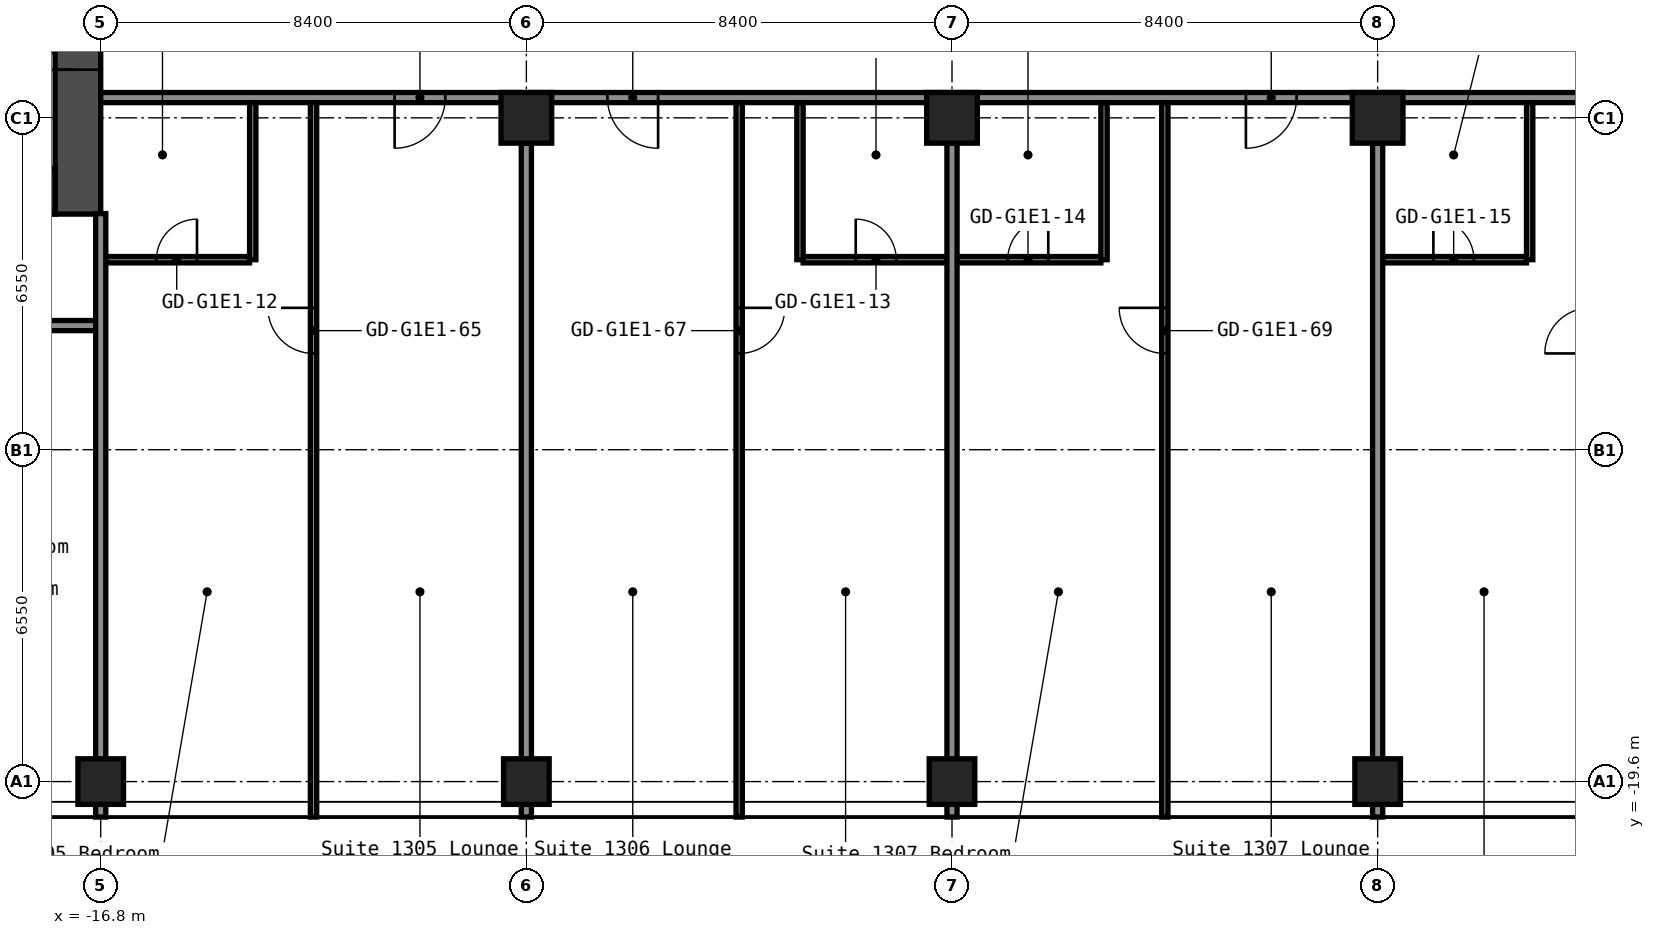
"""IFC4 building model, lengths in metres.
Left out: names, types, materials, properties, quantities, classifications, styles, units other than length and angle.
Written with IfcOpenShell. Run it as: python <this file> out.ifc"""

import sys

from ifc_helpers import new_model, si_unit, direction, frame, frame_2d, origin, origin_2d, place, context, subcontext, project, spatial, rectangle, hollow_rectangle, extrude, element, fill, save


model = new_model("IFC4")
c1 = context("Model", 3, precision=1e-05, world=origin(), true_north=direction((0.0, 1.0)))
c2 = subcontext(c1, "Body", "Model", "MODEL_VIEW")
j1 = project(units=[si_unit("LENGTHUNIT", "METRE"), si_unit("PLANEANGLEUNIT", "RADIAN")], contexts=[c1])
p1 = place(None, origin())
s1 = spatial("IfcSite", under=j1, at=p1, CompositionType="ELEMENT")
p2 = place(p1, origin())
s2 = spatial("IfcBuilding", under=s1, at=p2, CompositionType="ELEMENT")
p3 = place(p2, frame((0.0, 0.0, 48.6)))
s3 = spatial("IfcBuildingStorey", under=s2, at=p3, CompositionType="ELEMENT", Elevation=48.6)
for number, where, z_axis, x_axis in (
    (1, (-16.8, -19.6, 0.0), (0.0, 0.0, 1.0), (1.0, 0.0, 0.0)),
    (2, (-8.4, -19.6, 0.0), (0.0, 0.0, 1.0), (1.0, 0.0, 0.0)),
):
    element("IfcColumn", number, at=place(p3, frame(where, z_axis=z_axis, x_axis=x_axis)), inside=s3, PredefinedType="COLUMN", context=c2, shape_type="SweptSolid", body=[
        extrude(hollow_rectangle(XDim=0.9, YDim=0.9, WallThickness=0.036, at=origin_2d()), origin(), (0.0, 0.0, 1.0), 2.8),
    ])
p4 = place(p3, frame((-8.4, -6.5, 0.0), z_axis=(0.0, 0.0, 1.0), x_axis=(1.0, 0.0, 0.0)))
e3 = element("IfcColumn", 3, at=p4, inside=s3, PredefinedType="COLUMN", context=c2, shape_type="SweptSolid", body=[
    extrude(hollow_rectangle(XDim=1.0, YDim=1.0, WallThickness=0.04, at=origin_2d()), origin(), (0.0, 0.0, 1.0), 2.8),
])
p5 = place(p3, frame((0.0, -19.6, 0.0), z_axis=(0.0, 0.0, 1.0), x_axis=(1.0, 0.0, 0.0)))
e4 = element("IfcColumn", 4, at=p5, inside=s3, PredefinedType="COLUMN", context=c2, shape_type="SweptSolid", body=[
    extrude(hollow_rectangle(XDim=0.9, YDim=0.9, WallThickness=0.036, at=origin_2d()), origin(), (0.0, 0.0, 1.0), 2.8),
])
p6 = place(p3, frame((0.0, -6.5, 0.0), z_axis=(0.0, 0.0, 1.0), x_axis=(1.0, 0.0, 0.0)))
e5 = element("IfcColumn", 5, at=p6, inside=s3, PredefinedType="COLUMN", context=c2, shape_type="SweptSolid", body=[
    extrude(hollow_rectangle(XDim=1.0, YDim=1.0, WallThickness=0.04, at=origin_2d()), origin(), (0.0, 0.0, 1.0), 2.8),
])
p7 = place(p3, frame((8.4, -19.6, 0.0), z_axis=(0.0, 0.0, 1.0), x_axis=(1.0, 0.0, 0.0)))
e6 = element("IfcColumn", 6, at=p7, inside=s3, PredefinedType="COLUMN", context=c2, shape_type="SweptSolid", body=[
    extrude(hollow_rectangle(XDim=0.9, YDim=0.9, WallThickness=0.036, at=origin_2d()), origin(), (0.0, 0.0, 1.0), 2.8),
])
p8 = place(p3, frame((8.4, -6.5, 0.0), z_axis=(0.0, 0.0, 1.0), x_axis=(1.0, 0.0, 0.0)))
e7 = element("IfcColumn", 7, at=p8, inside=s3, PredefinedType="COLUMN", context=c2, shape_type="SweptSolid", body=[
    extrude(hollow_rectangle(XDim=1.0, YDim=1.0, WallThickness=0.04, at=origin_2d()), origin(), (0.0, 0.0, 1.0), 2.8),
])
p9 = place(p3, frame((-17.25, -8.4, 0.0), z_axis=(0.0, 0.0, 1.0), x_axis=(0.0, 1.0, 0.0)))
e8 = element("IfcWall", 8, at=p9, inside=s3, PredefinedType="SHEAR", context=c2, shape_type="SweptSolid", body=[
    extrude(rectangle(XDim=16.8, YDim=0.9, at=frame_2d((8.4, 0.0))), origin(), (0.0, 0.0, 1.0), 2.8),
])
p10 = place(p9, frame((12.75, 0.0, 0.0)))
e9 = element("IfcOpeningElement", 9, at=p10, cuts=e8, PredefinedType="OPENING", context=c2, shape_type="SweptSolid", body=[
    extrude(rectangle(XDim=1.2, YDim=2.1, at=frame_2d((0.6, 1.05))), frame((0.0, 0.46, 0.0), z_axis=(0.0, -1.0, 0.0), x_axis=(1.0, 0.0, 0.0)), (0.0, 0.0, 1.0), 0.92),
])
p11 = place(p9, frame((2.85, 0.0, 0.0)))
e10 = element("IfcOpeningElement", 10, at=p11, cuts=e8, PredefinedType="OPENING", context=c2, shape_type="SweptSolid", body=[
    extrude(rectangle(XDim=1.2, YDim=2.1, at=frame_2d((0.6, 1.05))), frame((0.0, 0.46, 0.0), z_axis=(0.0, -1.0, 0.0), x_axis=(1.0, 0.0, 0.0)), (0.0, 0.0, 1.0), 0.92),
])
p12 = place(p3, frame((-32.7, -7.95, 0.0), z_axis=(0.0, 0.0, 1.0), x_axis=(1.0, 0.0, 0.0)))
e11 = element("IfcWall", 11, at=p12, inside=s3, PredefinedType="SHEAR", context=c2, shape_type="SweptSolid", body=[
    extrude(rectangle(XDim=15.0, YDim=0.9, at=frame_2d((7.5, 0.0))), origin(), (0.0, 0.0, 1.0), 2.8),
])
p13 = place(p12, frame((11.45, 0.0, 0.0)))
e12 = element("IfcOpeningElement", 12, at=p13, cuts=e11, PredefinedType="OPENING", context=c2, shape_type="SweptSolid", body=[
    extrude(rectangle(XDim=1.0, YDim=2.1, at=frame_2d((0.5, 1.05))), frame((0.0, 0.46, 0.0), z_axis=(0.0, -1.0, 0.0), x_axis=(1.0, 0.0, 0.0)), (0.0, 0.0, 1.0), 0.92),
])
p14 = place(p3, frame((-51.1, -10.6, 0.0), z_axis=(0.0, 0.0, 1.0), x_axis=(1.0, 0.0, 0.0)))
e13 = element("IfcWall", 13, at=p14, inside=s3, PredefinedType="PARTITIONING", context=c2, shape_type="SweptSolid", body=[
    extrude(rectangle(XDim=34.3, YDim=0.2, at=frame_2d((17.15, 0.0))), origin(), (0.0, 0.0, 1.0), 2.8),
])
p15 = place(p14, frame((2.58, 0.0, 0.0)))
e14 = element("IfcOpeningElement", 14, at=p15, cuts=e13, PredefinedType="OPENING", context=c2, shape_type="SweptSolid", body=[
    extrude(rectangle(XDim=0.9, YDim=2.1, at=frame_2d((0.45, 1.05))), frame((0.0, 0.11, 0.0), z_axis=(0.0, -1.0, 0.0), x_axis=(1.0, 0.0, 0.0)), (0.0, 0.0, 1.0), 0.22),
])
p16 = place(p14, frame((6.98, 0.0, 0.0)))
e15 = element("IfcOpeningElement", 15, at=p16, cuts=e13, PredefinedType="OPENING", context=c2, shape_type="SweptSolid", body=[
    extrude(rectangle(XDim=0.9, YDim=2.1, at=frame_2d((0.45, 1.05))), frame((0.0, 0.11, 0.0), z_axis=(0.0, -1.0, 0.0), x_axis=(1.0, 0.0, 0.0)), (0.0, 0.0, 1.0), 0.22),
])
p17 = place(p14, frame((12.8, 0.0, 0.0)))
e16 = element("IfcOpeningElement", 16, at=p17, cuts=e13, PredefinedType="OPENING", context=c2, shape_type="SweptSolid", body=[
    extrude(rectangle(XDim=1.0, YDim=2.1, at=frame_2d((0.5, 1.05))), frame((0.0, 0.11, 0.0), z_axis=(0.0, -1.0, 0.0), x_axis=(1.0, 0.0, 0.0)), (0.0, 0.0, 1.0), 0.22),
])
p18 = place(p14, frame((19.4, 0.0, 0.0)))
e17 = element("IfcOpeningElement", 17, at=p18, cuts=e13, PredefinedType="OPENING", context=c2, shape_type="SweptSolid", body=[
    extrude(rectangle(XDim=0.9, YDim=2.1, at=frame_2d((0.45, 1.05))), frame((0.0, 0.11, 0.0), z_axis=(0.0, -1.0, 0.0), x_axis=(1.0, 0.0, 0.0)), (0.0, 0.0, 1.0), 0.22),
])
p19 = place(p14, frame((23.6, 0.0, 0.0)))
e18 = element("IfcOpeningElement", 18, at=p19, cuts=e13, PredefinedType="OPENING", context=c2, shape_type="SweptSolid", body=[
    extrude(rectangle(XDim=0.9, YDim=2.1, at=frame_2d((0.45, 1.05))), frame((0.0, 0.11, 0.0), z_axis=(0.0, -1.0, 0.0), x_axis=(1.0, 0.0, 0.0)), (0.0, 0.0, 1.0), 0.22),
])
p20 = place(p14, frame((27.3, 0.0, 0.0)))
e19 = element("IfcOpeningElement", 19, at=p20, cuts=e13, PredefinedType="OPENING", context=c2, shape_type="SweptSolid", body=[
    extrude(rectangle(XDim=0.9, YDim=2.1, at=frame_2d((0.45, 1.05))), frame((0.0, 0.11, 0.0), z_axis=(0.0, -1.0, 0.0), x_axis=(1.0, 0.0, 0.0)), (0.0, 0.0, 1.0), 0.22),
])
p21 = place(p14, frame((31.5, 0.0, 0.0)))
e20 = element("IfcOpeningElement", 20, at=p21, cuts=e13, PredefinedType="OPENING", context=c2, shape_type="SweptSolid", body=[
    extrude(rectangle(XDim=0.9, YDim=2.1, at=frame_2d((0.45, 1.05))), frame((0.0, 0.11, 0.0), z_axis=(0.0, -1.0, 0.0), x_axis=(1.0, 0.0, 0.0)), (0.0, 0.0, 1.0), 0.22),
])
p22 = place(p3, frame((-16.7, -9.3, 0.0), z_axis=(0.0, 0.0, 1.0), x_axis=(1.0, 0.0, 0.0)))
e21 = element("IfcWall", 21, at=p22, inside=s3, PredefinedType="PARTITIONING", context=c2, shape_type="SweptSolid", body=[
    extrude(rectangle(XDim=2.837, YDim=0.125, at=frame_2d((1.419, 0.0))), origin(), (0.0, 0.0, 1.0), 2.8),
])
p23 = place(p22, frame((1.0, 0.0, 0.0)))
e22 = element("IfcOpeningElement", 22, at=p23, cuts=e21, PredefinedType="OPENING", context=c2, shape_type="SweptSolid", body=[
    extrude(rectangle(XDim=0.8, YDim=2.1, at=frame_2d((0.4, 1.05))), frame((0.0, 0.073, 0.0), z_axis=(0.0, -1.0, 0.0), x_axis=(1.0, 0.0, 0.0)), (0.0, 0.0, 1.0), 0.145),
])
p24 = place(p3, frame((-2.938, -9.3, 0.0), z_axis=(0.0, 0.0, 1.0), x_axis=(1.0, 0.0, 0.0)))
e23 = element("IfcWall", 23, at=p24, inside=s3, PredefinedType="PARTITIONING", context=c2, shape_type="SweptSolid", body=[
    extrude(rectangle(XDim=5.875, YDim=0.125, at=frame_2d((2.938, 0.0))), origin(), (0.0, 0.0, 1.0), 2.8),
])
p25 = place(p24, frame((1.038, 0.0, 0.0)))
e24 = element("IfcOpeningElement", 24, at=p25, cuts=e23, PredefinedType="OPENING", context=c2, shape_type="SweptSolid", body=[
    extrude(rectangle(XDim=0.8, YDim=2.1, at=frame_2d((0.4, 1.05))), frame((0.0, 0.073, 0.0), z_axis=(0.0, -1.0, 0.0), x_axis=(1.0, 0.0, 0.0)), (0.0, 0.0, 1.0), 0.145),
])
p26 = place(p24, frame((4.038, 0.0, 0.0)))
e25 = element("IfcOpeningElement", 25, at=p26, cuts=e23, PredefinedType="OPENING", context=c2, shape_type="SweptSolid", body=[
    extrude(rectangle(XDim=0.8, YDim=2.1, at=frame_2d((0.4, 1.05))), frame((0.0, 0.073, 0.0), z_axis=(0.0, -1.0, 0.0), x_axis=(1.0, 0.0, 0.0)), (0.0, 0.0, 1.0), 0.145),
])
p27 = place(p3, frame((8.5, -9.3, 0.0), z_axis=(0.0, 0.0, 1.0), x_axis=(1.0, 0.0, 0.0)))
e26 = element("IfcWall", 26, at=p27, inside=s3, PredefinedType="PARTITIONING", context=c2, shape_type="SweptSolid", body=[
    extrude(rectangle(XDim=2.837, YDim=0.125, at=frame_2d((1.419, 0.0))), origin(), (0.0, 0.0, 1.0), 2.8),
])
p28 = place(p27, frame((1.0, 0.0, 0.0)))
e27 = element("IfcOpeningElement", 27, at=p28, cuts=e26, PredefinedType="OPENING", context=c2, shape_type="SweptSolid", body=[
    extrude(rectangle(XDim=0.8, YDim=2.1, at=frame_2d((0.4, 1.05))), frame((0.0, 0.073, 0.0), z_axis=(0.0, -1.0, 0.0), x_axis=(1.0, 0.0, 0.0)), (0.0, 0.0, 1.0), 0.145),
])
p29 = place(p3, frame((-16.8, -6.1, 0.0), z_axis=(0.0, 0.0, 1.0), x_axis=(1.0, 0.0, 0.0)))
e28 = element("IfcWall", 28, at=p29, inside=s3, PredefinedType="PARTITIONING", context=c2, shape_type="SweptSolid", body=[
    extrude(rectangle(XDim=33.6, YDim=0.2, at=frame_2d((16.8, 0.0))), origin(), (0.0, 0.0, 1.0), 2.8),
])
p30 = place(p29, frame((5.8, 0.0, 0.0)))
e29 = element("IfcOpeningElement", 29, at=p30, cuts=e28, PredefinedType="OPENING", context=c2, shape_type="SweptSolid", body=[
    extrude(rectangle(XDim=1.0, YDim=2.1, at=frame_2d((0.5, 1.05))), frame((0.0, 0.11, 0.0), z_axis=(0.0, -1.0, 0.0), x_axis=(1.0, 0.0, 0.0)), (0.0, 0.0, 1.0), 0.22),
])
p31 = place(p29, frame((10.0, 0.0, 0.0)))
e30 = element("IfcOpeningElement", 30, at=p31, cuts=e28, PredefinedType="OPENING", context=c2, shape_type="SweptSolid", body=[
    extrude(rectangle(XDim=1.0, YDim=2.1, at=frame_2d((0.5, 1.05))), frame((0.0, 0.11, 0.0), z_axis=(0.0, -1.0, 0.0), x_axis=(1.0, 0.0, 0.0)), (0.0, 0.0, 1.0), 0.22),
])
p32 = place(p29, frame((22.6, 0.0, 0.0)))
e31 = element("IfcOpeningElement", 31, at=p32, cuts=e28, PredefinedType="OPENING", context=c2, shape_type="SweptSolid", body=[
    extrude(rectangle(XDim=1.0, YDim=2.1, at=frame_2d((0.5, 1.05))), frame((0.0, 0.11, 0.0), z_axis=(0.0, -1.0, 0.0), x_axis=(1.0, 0.0, 0.0)), (0.0, 0.0, 1.0), 0.22),
])
p33 = place(p29, frame((31.0, 0.0, 0.0)))
e32 = element("IfcOpeningElement", 32, at=p33, cuts=e28, PredefinedType="OPENING", context=c2, shape_type="SweptSolid", body=[
    extrude(rectangle(XDim=1.0, YDim=2.1, at=frame_2d((0.5, 1.05))), frame((0.0, 0.11, 0.0), z_axis=(0.0, -1.0, 0.0), x_axis=(1.0, 0.0, 0.0)), (0.0, 0.0, 1.0), 0.22),
])
p34 = place(p3, frame((-16.8, -20.3, 0.0), z_axis=(0.0, 0.0, 1.0), x_axis=(0.0, 1.0, 0.0)))
e33 = element("IfcWall", 33, at=p34, inside=s3, PredefinedType="PARTITIONING", context=c2, shape_type="SweptSolid", body=[
    extrude(rectangle(XDim=11.91, YDim=0.2, at=frame_2d((5.955, 0.0))), origin(), (0.0, 0.0, 1.0), 2.8),
])
p35 = place(p3, frame((-13.8, -9.3, 0.0), z_axis=(0.0, 0.0, 1.0), x_axis=(0.0, 1.0, 0.0)))
e34 = element("IfcWall", 34, at=p35, inside=s3, PredefinedType="PARTITIONING", context=c2, shape_type="SweptSolid", body=[
    extrude(rectangle(XDim=3.1, YDim=0.125, at=frame_2d((1.55, 0.0))), origin(), (0.0, 0.0, 1.0), 2.8),
])
p36 = place(p3, frame((-12.6, -20.3, 0.0), z_axis=(0.0, 0.0, 1.0), x_axis=(0.0, 1.0, 0.0)))
e35 = element("IfcWall", 35, at=p36, inside=s3, PredefinedType="PARTITIONING", context=c2, shape_type="SweptSolid", body=[
    extrude(rectangle(XDim=14.1, YDim=0.125, at=frame_2d((7.05, 0.0))), origin(), (0.0, 0.0, 1.0), 2.8),
])
p37 = place(p36, frame((9.15, 0.0, 0.0)))
e36 = element("IfcOpeningElement", 36, at=p37, cuts=e35, PredefinedType="OPENING", context=c2, shape_type="SweptSolid", body=[
    extrude(rectangle(XDim=0.9, YDim=2.1, at=frame_2d((0.45, 1.05))), frame((0.0, 0.073, 0.0), z_axis=(0.0, -1.0, 0.0), x_axis=(1.0, 0.0, 0.0)), (0.0, 0.0, 1.0), 0.145),
])
p38 = place(p3, frame((-8.4, -20.3, 0.0), z_axis=(0.0, 0.0, 1.0), x_axis=(0.0, 1.0, 0.0)))
e37 = element("IfcWall", 37, at=p38, inside=s3, PredefinedType="PARTITIONING", context=c2, shape_type="SweptSolid", body=[
    extrude(rectangle(XDim=13.31, YDim=0.2, at=frame_2d((6.655, 0.0))), origin(), (0.0, 0.0, 1.0), 2.8),
])
p39 = place(p3, frame((-4.2, -20.3, 0.0), z_axis=(0.0, 0.0, 1.0), x_axis=(0.0, 1.0, 0.0)))
e38 = element("IfcWall", 38, at=p39, inside=s3, PredefinedType="PARTITIONING", context=c2, shape_type="SweptSolid", body=[
    extrude(rectangle(XDim=14.1, YDim=0.125, at=frame_2d((7.05, 0.0))), origin(), (0.0, 0.0, 1.0), 2.8),
])
p40 = place(p39, frame((9.15, 0.0, 0.0)))
e39 = element("IfcOpeningElement", 39, at=p40, cuts=e38, PredefinedType="OPENING", context=c2, shape_type="SweptSolid", body=[
    extrude(rectangle(XDim=0.9, YDim=2.1, at=frame_2d((0.45, 1.05))), frame((0.0, 0.073, 0.0), z_axis=(0.0, -1.0, 0.0), x_axis=(1.0, 0.0, 0.0)), (0.0, 0.0, 1.0), 0.145),
])
p41 = place(p3, frame((-3.0, -9.3, 0.0), z_axis=(0.0, 0.0, 1.0), x_axis=(0.0, 1.0, 0.0)))
e40 = element("IfcWall", 40, at=p41, inside=s3, PredefinedType="PARTITIONING", context=c2, shape_type="SweptSolid", body=[
    extrude(rectangle(XDim=3.1, YDim=0.125, at=frame_2d((1.55, 0.0))), origin(), (0.0, 0.0, 1.0), 2.8),
])
p42 = place(p3, frame((0.0, -20.3, 0.0), z_axis=(0.0, 0.0, 1.0), x_axis=(0.0, 1.0, 0.0)))
e41 = element("IfcWall", 41, at=p42, inside=s3, PredefinedType="PARTITIONING", context=c2, shape_type="SweptSolid", body=[
    extrude(rectangle(XDim=13.31, YDim=0.2, at=frame_2d((6.655, 0.0))), origin(), (0.0, 0.0, 1.0), 2.8),
])
p43 = place(p3, frame((3.0, -9.3, 0.0), z_axis=(0.0, 0.0, 1.0), x_axis=(0.0, 1.0, 0.0)))
e42 = element("IfcWall", 42, at=p43, inside=s3, PredefinedType="PARTITIONING", context=c2, shape_type="SweptSolid", body=[
    extrude(rectangle(XDim=3.1, YDim=0.125, at=frame_2d((1.55, 0.0))), origin(), (0.0, 0.0, 1.0), 2.8),
])
p44 = place(p3, frame((4.2, -20.3, 0.0), z_axis=(0.0, 0.0, 1.0), x_axis=(0.0, 1.0, 0.0)))
e43 = element("IfcWall", 43, at=p44, inside=s3, PredefinedType="PARTITIONING", context=c2, shape_type="SweptSolid", body=[
    extrude(rectangle(XDim=14.1, YDim=0.125, at=frame_2d((7.05, 0.0))), origin(), (0.0, 0.0, 1.0), 2.8),
])
p45 = place(p44, frame((9.15, 0.0, 0.0)))
e44 = element("IfcOpeningElement", 44, at=p45, cuts=e43, PredefinedType="OPENING", context=c2, shape_type="SweptSolid", body=[
    extrude(rectangle(XDim=0.9, YDim=2.1, at=frame_2d((0.45, 1.05))), frame((0.0, 0.073, 0.0), z_axis=(0.0, -1.0, 0.0), x_axis=(1.0, 0.0, 0.0)), (0.0, 0.0, 1.0), 0.145),
])
p46 = place(p3, frame((8.4, -20.3, 0.0), z_axis=(0.0, 0.0, 1.0), x_axis=(0.0, 1.0, 0.0)))
e45 = element("IfcWall", 45, at=p46, inside=s3, PredefinedType="PARTITIONING", context=c2, shape_type="SweptSolid", body=[
    extrude(rectangle(XDim=13.31, YDim=0.2, at=frame_2d((6.655, 0.0))), origin(), (0.0, 0.0, 1.0), 2.8),
])
p47 = place(p3, frame((11.4, -9.3, 0.0), z_axis=(0.0, 0.0, 1.0), x_axis=(0.0, 1.0, 0.0)))
e46 = element("IfcWall", 46, at=p47, inside=s3, PredefinedType="PARTITIONING", context=c2, shape_type="SweptSolid", body=[
    extrude(rectangle(XDim=3.1, YDim=0.125, at=frame_2d((1.55, 0.0))), origin(), (0.0, 0.0, 1.0), 2.8),
])
p48 = place(p11, origin())
e47 = element("IfcDoor", 47, at=p48, inside=s3, OperationType="DOUBLE_DOOR_SINGLE_SWING", PredefinedType="DOOR", context=c2, shape_type="SweptSolid", body=[
    extrude(rectangle(XDim=1.2, YDim=2.1, at=frame_2d((0.6, 1.05))), frame((0.0, 0.025, 0.0), z_axis=(0.0, -1.0, 0.0), x_axis=(1.0, 0.0, 0.0)), (0.0, 0.0, 1.0), 0.05),
])
fill(e10, e47)
p49 = place(p23, origin())
e48 = element("IfcDoor", 48, at=p49, inside=s3, OperationType="SINGLE_SWING_LEFT", PredefinedType="DOOR", context=c2, shape_type="SweptSolid", body=[
    extrude(rectangle(XDim=0.8, YDim=2.1, at=frame_2d((0.4, 1.05))), frame((0.0, 0.025, 0.0), z_axis=(0.0, -1.0, 0.0), x_axis=(1.0, 0.0, 0.0)), (0.0, 0.0, 1.0), 0.05),
])
fill(e22, e48)
p50 = place(p25, origin())
e49 = element("IfcDoor", 49, at=p50, inside=s3, OperationType="SINGLE_SWING_RIGHT", PredefinedType="DOOR", context=c2, shape_type="SweptSolid", body=[
    extrude(rectangle(XDim=0.8, YDim=2.1, at=frame_2d((0.4, 1.05))), frame((0.0, 0.025, 0.0), z_axis=(0.0, -1.0, 0.0), x_axis=(1.0, 0.0, 0.0)), (0.0, 0.0, 1.0), 0.05),
])
fill(e24, e49)
p51 = place(p26, origin())
e50 = element("IfcDoor", 50, at=p51, inside=s3, OperationType="SINGLE_SWING_LEFT", PredefinedType="DOOR", context=c2, shape_type="SweptSolid", body=[
    extrude(rectangle(XDim=0.8, YDim=2.1, at=frame_2d((0.4, 1.05))), frame((0.0, 0.025, 0.0), z_axis=(0.0, -1.0, 0.0), x_axis=(1.0, 0.0, 0.0)), (0.0, 0.0, 1.0), 0.05),
])
fill(e25, e50)
p52 = place(p28, origin())
e51 = element("IfcDoor", 51, at=p52, inside=s3, OperationType="SINGLE_SWING_RIGHT", PredefinedType="DOOR", context=c2, shape_type="SweptSolid", body=[
    extrude(rectangle(XDim=0.8, YDim=2.1, at=frame_2d((0.4, 1.05))), frame((0.0, 0.025, 0.0), z_axis=(0.0, -1.0, 0.0), x_axis=(1.0, 0.0, 0.0)), (0.0, 0.0, 1.0), 0.05),
])
fill(e27, e51)
p53 = place(p30, origin())
e52 = element("IfcDoor", 52, at=p53, inside=s3, OperationType="SINGLE_SWING_LEFT", PredefinedType="DOOR", context=c2, shape_type="SweptSolid", body=[
    extrude(rectangle(XDim=1.0, YDim=2.1, at=frame_2d((0.5, 1.05))), frame((0.0, 0.025, 0.0), z_axis=(0.0, -1.0, 0.0), x_axis=(1.0, 0.0, 0.0)), (0.0, 0.0, 1.0), 0.05),
])
fill(e29, e52)
p54 = place(p31, origin())
e53 = element("IfcDoor", 53, at=p54, inside=s3, OperationType="SINGLE_SWING_RIGHT", PredefinedType="DOOR", context=c2, shape_type="SweptSolid", body=[
    extrude(rectangle(XDim=1.0, YDim=2.1, at=frame_2d((0.5, 1.05))), frame((0.0, 0.025, 0.0), z_axis=(0.0, -1.0, 0.0), x_axis=(1.0, 0.0, 0.0)), (0.0, 0.0, 1.0), 0.05),
])
fill(e30, e53)
p55 = place(p32, origin())
e54 = element("IfcDoor", 54, at=p55, inside=s3, OperationType="SINGLE_SWING_LEFT", PredefinedType="DOOR", context=c2, shape_type="SweptSolid", body=[
    extrude(rectangle(XDim=1.0, YDim=2.1, at=frame_2d((0.5, 1.05))), frame((0.0, 0.025, 0.0), z_axis=(0.0, -1.0, 0.0), x_axis=(1.0, 0.0, 0.0)), (0.0, 0.0, 1.0), 0.05),
])
fill(e31, e54)
p56 = place(p37, origin())
e55 = element("IfcDoor", 55, at=p56, inside=s3, OperationType="SINGLE_SWING_LEFT", PredefinedType="DOOR", context=c2, shape_type="SweptSolid", body=[
    extrude(rectangle(XDim=0.9, YDim=2.1, at=frame_2d((0.45, 1.05))), frame((0.0, 0.025, 0.0), z_axis=(0.0, -1.0, 0.0), x_axis=(1.0, 0.0, 0.0)), (0.0, 0.0, 1.0), 0.05),
])
fill(e36, e55)
p57 = place(p40, origin())
e56 = element("IfcDoor", 56, at=p57, inside=s3, OperationType="SINGLE_SWING_RIGHT", PredefinedType="DOOR", context=c2, shape_type="SweptSolid", body=[
    extrude(rectangle(XDim=0.9, YDim=2.1, at=frame_2d((0.45, 1.05))), frame((0.0, 0.025, 0.0), z_axis=(0.0, -1.0, 0.0), x_axis=(1.0, 0.0, 0.0)), (0.0, 0.0, 1.0), 0.05),
])
fill(e39, e56)
p58 = place(p45, origin())
e57 = element("IfcDoor", 57, at=p58, inside=s3, OperationType="SINGLE_SWING_LEFT", PredefinedType="DOOR", context=c2, shape_type="SweptSolid", body=[
    extrude(rectangle(XDim=0.9, YDim=2.1, at=frame_2d((0.45, 1.05))), frame((0.0, 0.025, 0.0), z_axis=(0.0, -1.0, 0.0), x_axis=(1.0, 0.0, 0.0)), (0.0, 0.0, 1.0), 0.05),
])
fill(e44, e57)
save(model, sys.argv[1])
